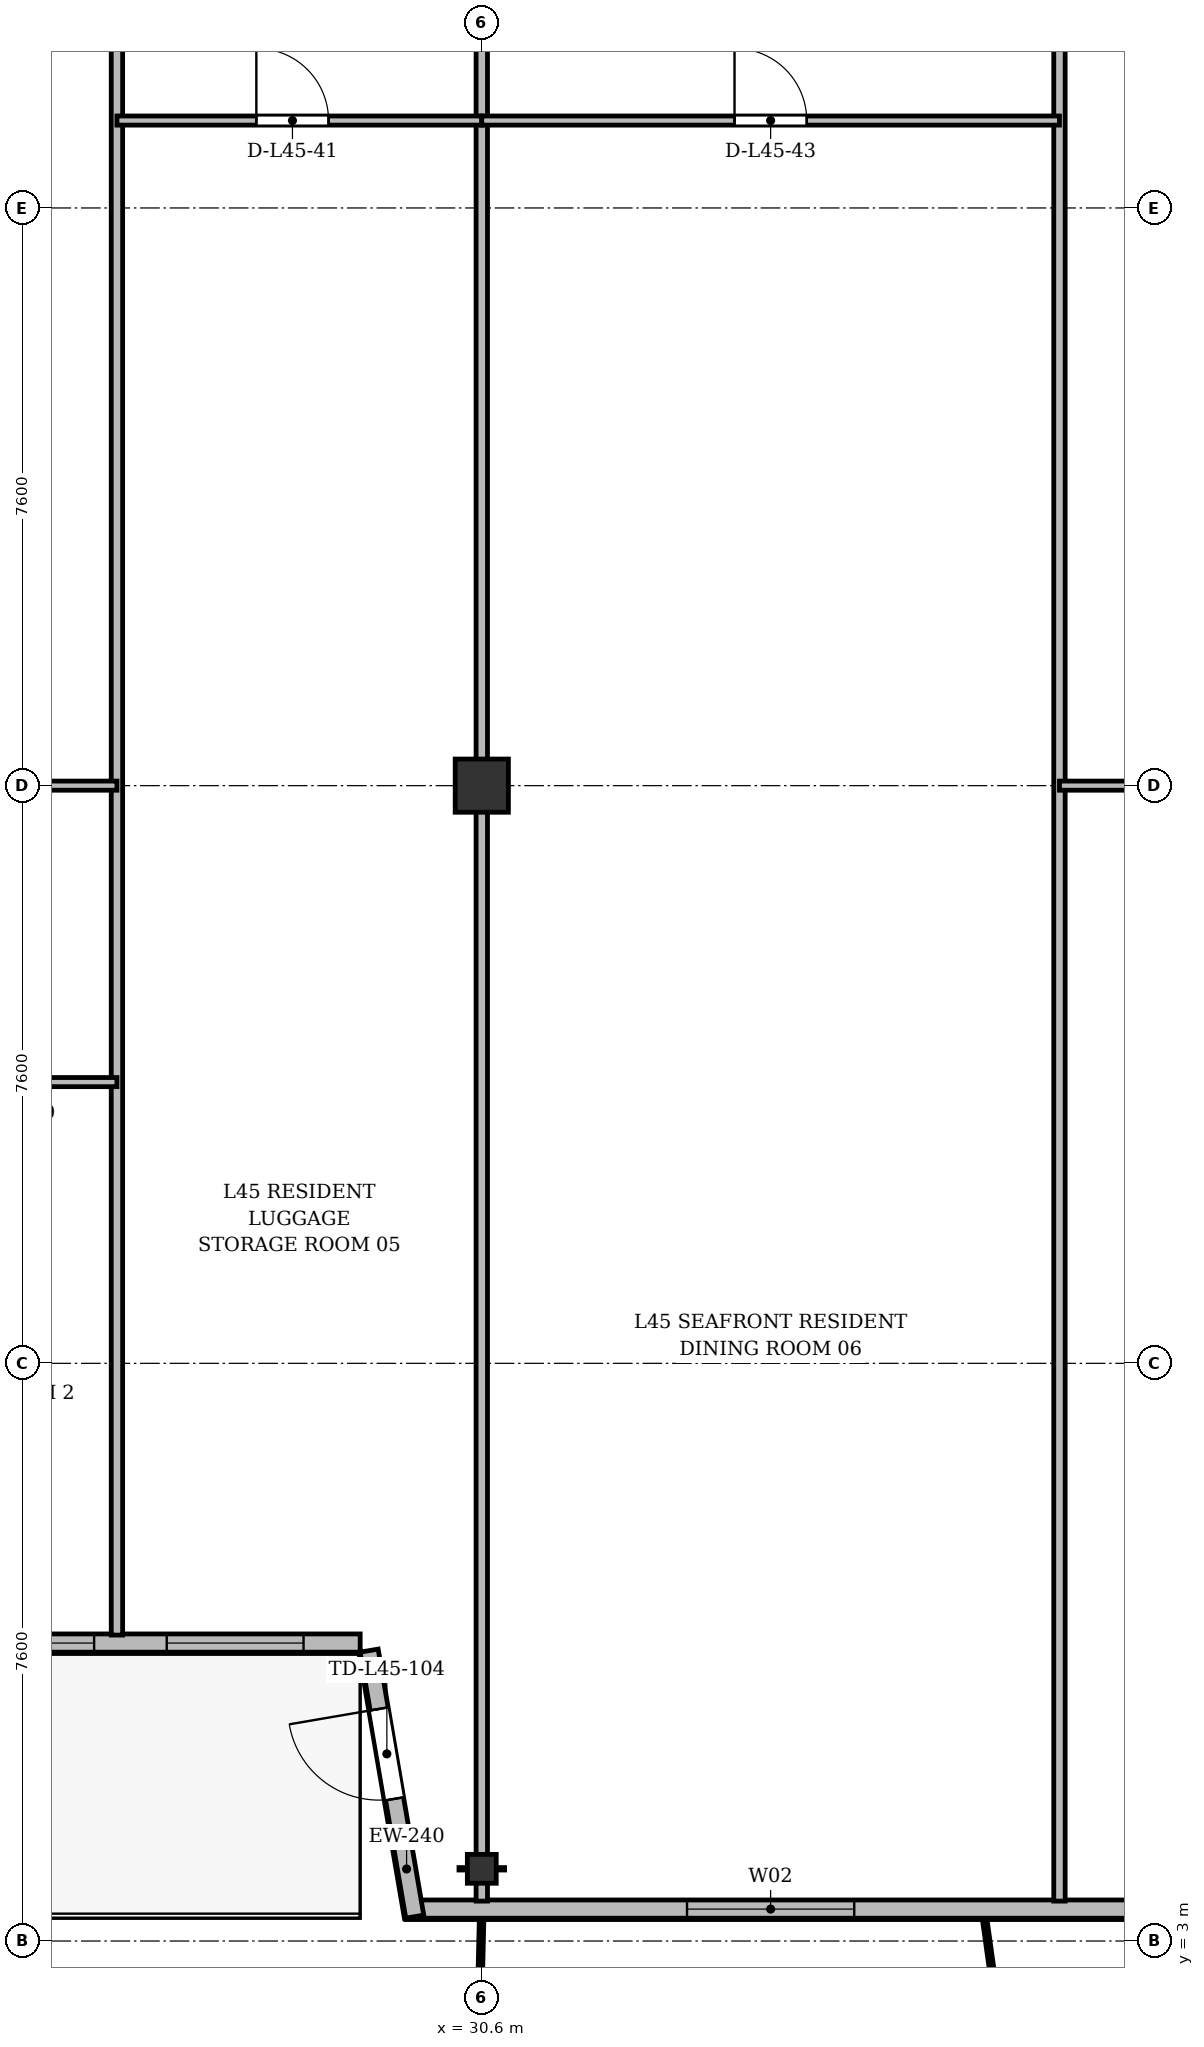
"""IFC4 building model, lengths in metres.
Left out: names, types, materials, properties, quantities, classifications, styles, units other than length and angle.
Written with IfcOpenShell. Run it as: python <this file> out.ifc"""

import sys

from ifc_helpers import new_model, si_unit, direction, frame, frame_2d, origin, origin_2d, place, context, subcontext, project, spatial, rectangle, i_section, extrude, source, transform, mapped, element, fill, save


model = new_model("IFC4")
c1 = context("Model", 3, precision=1e-05, world=origin(), true_north=direction((0.0, 1.0)))
c2 = subcontext(c1, "Body", "Model", "MODEL_VIEW")
j1 = project(units=[si_unit("LENGTHUNIT", "METRE"), si_unit("PLANEANGLEUNIT", "RADIAN")], contexts=[c1])
p1 = place(None, origin())
s1 = spatial("IfcSite", under=j1, at=p1, CompositionType="ELEMENT")
p2 = place(p1, origin())
s2 = spatial("IfcBuilding", under=s1, at=p2, CompositionType="ELEMENT")
p3 = place(p2, frame((0.0, 0.0, 171.7)))
s3 = spatial("IfcBuildingStorey", under=s2, at=p3, CompositionType="ELEMENT", Elevation=171.7)
m1 = source(origin(), c2, "Body", "SweptSolid", [
    extrude(i_section(OverallWidth=0.38, OverallDepth=0.38, WebThickness=0.02, FlangeThickness=0.03, at=origin_2d()), origin(), (0.0, 0.0, 1.0), 3.6),
])
p4 = place(p3, frame((30.6, 3.95, 0.0), z_axis=(0.0, 0.0, 1.0), x_axis=(1.0, 0.0, 0.0)))
e1 = element("IfcColumn", 1, at=p4, inside=s3, PredefinedType="COLUMN", context=c2, shape_type="MappedRepresentation", body=[
    mapped(m1, transform((0.0, 0.0, 0.0), x_axis=(1.0, 0.0, 0.0), y_axis=(0.0, 1.0, 0.0), z_axis=(0.0, 0.0, 1.0), scale=1.0)),
])
m2 = source(origin(), c2, "Body", "SweptSolid", [
    extrude(rectangle(XDim=0.7, YDim=0.7, at=origin_2d()), origin(), (0.0, 0.0, 1.0), 3.6),
])
p5 = place(p3, frame((30.6, 18.2, 0.0), z_axis=(0.0, 0.0, 1.0), x_axis=(1.0, 0.0, 0.0)))
e2 = element("IfcColumn", 2, at=p5, inside=s3, PredefinedType="COLUMN", context=c2, shape_type="MappedRepresentation", body=[
    mapped(m2, transform((0.0, 0.0, 0.0), x_axis=(1.0, 0.0, 0.0), y_axis=(0.0, 1.0, 0.0), z_axis=(0.0, 0.0, 1.0), scale=1.0)),
])
p6 = place(p3, frame((63.6, 3.42, 0.0), z_axis=(0.0, 0.0, 1.0), x_axis=(-1.0, 0.0, 0.0)))
e3 = element("IfcWall", 3, at=p6, inside=s3, PredefinedType="SOLIDWALL", context=c2, shape_type="SweptSolid", body=[
    extrude(rectangle(XDim=34.0, YDim=0.24, at=frame_2d((17.0, 0.0))), origin(), (0.0, 0.0, 1.0), 3.35),
])
p7 = place(p6, frame((2.845, 0.0, 0.9)))
e4 = element("IfcOpeningElement", 4, at=p7, cuts=e3, PredefinedType="OPENING", context=c2, shape_type="SweptSolid", body=[
    extrude(rectangle(XDim=1.8, YDim=1.8, at=frame_2d((0.9, 0.9))), frame((0.0, 0.13, 0.0), z_axis=(0.0, -1.0, 0.0), x_axis=(1.0, 0.0, 0.0)), (0.0, 0.0, 1.0), 0.26),
])
p8 = place(p6, frame((7.69, 0.0, 0.0)))
e5 = element("IfcOpeningElement", 5, at=p8, cuts=e3, PredefinedType="OPENING", context=c2, shape_type="SweptSolid", body=[
    extrude(rectangle(XDim=1.2, YDim=2.2, at=frame_2d((0.6, 1.1))), frame((0.0, 0.13, 0.0), z_axis=(0.0, -1.0, 0.0), x_axis=(1.0, 0.0, 0.0)), (0.0, 0.0, 1.0), 0.26),
])
p9 = place(p6, frame((10.25, 0.0, 0.9)))
e6 = element("IfcOpeningElement", 6, at=p9, cuts=e3, PredefinedType="OPENING", context=c2, shape_type="SweptSolid", body=[
    extrude(rectangle(XDim=1.5, YDim=1.75, at=frame_2d((0.75, 0.875))), frame((0.0, 0.13, 0.0), z_axis=(0.0, -1.0, 0.0), x_axis=(1.0, 0.0, 0.0)), (0.0, 0.0, 1.0), 0.26),
])
p10 = place(p6, frame((13.4, 0.0, 0.9)))
e7 = element("IfcOpeningElement", 7, at=p10, cuts=e3, PredefinedType="OPENING", context=c2, shape_type="SweptSolid", body=[
    extrude(rectangle(XDim=2.0, YDim=1.95, at=frame_2d((1.0, 0.975))), frame((0.0, 0.13, 0.0), z_axis=(0.0, -1.0, 0.0), x_axis=(1.0, 0.0, 0.0)), (0.0, 0.0, 1.0), 0.26),
])
p11 = place(p6, frame((17.175, 0.0, 0.9)))
e8 = element("IfcOpeningElement", 8, at=p11, cuts=e3, PredefinedType="OPENING", context=c2, shape_type="SweptSolid", body=[
    extrude(rectangle(XDim=1.65, YDim=1.85, at=frame_2d((0.825, 0.925))), frame((0.0, 0.13, 0.0), z_axis=(0.0, -1.0, 0.0), x_axis=(1.0, 0.0, 0.0)), (0.0, 0.0, 1.0), 0.26),
])
p12 = place(p6, frame((21.7, 0.0, 0.9)))
e9 = element("IfcOpeningElement", 9, at=p12, cuts=e3, PredefinedType="OPENING", context=c2, shape_type="SweptSolid", body=[
    extrude(rectangle(XDim=1.8, YDim=1.8, at=frame_2d((0.9, 0.9))), frame((0.0, 0.13, 0.0), z_axis=(0.0, -1.0, 0.0), x_axis=(1.0, 0.0, 0.0)), (0.0, 0.0, 1.0), 0.26),
])
p13 = place(p6, frame((28.1, 0.0, 0.9)))
e10 = element("IfcOpeningElement", 10, at=p13, cuts=e3, PredefinedType="OPENING", context=c2, shape_type="SweptSolid", body=[
    extrude(rectangle(XDim=2.2, YDim=1.8, at=frame_2d((1.1, 0.9))), frame((0.0, 0.13, 0.0), z_axis=(0.0, -1.0, 0.0), x_axis=(1.0, 0.0, 0.0)), (0.0, 0.0, 1.0), 0.26),
])
p14 = place(p3, frame((29.718, 3.32, 0.0), z_axis=(0.0, 0.0, 1.0), x_axis=(-0.168923741424, 0.98562912375, 0.0)))
e11 = element("IfcWall", 11, at=p14, inside=s3, PredefinedType="SOLIDWALL", context=c2, shape_type="SweptSolid", body=[
    extrude(rectangle(XDim=3.551, YDim=0.24, at=frame_2d((1.775, 0.0))), origin(), (0.0, 0.0, 1.0), 2.75),
])
p15 = place(p14, frame((1.573, 0.0, 0.0)))
e12 = element("IfcOpeningElement", 12, at=p15, cuts=e11, PredefinedType="OPENING", context=c2, shape_type="SweptSolid", body=[
    extrude(rectangle(XDim=1.2, YDim=2.2, at=frame_2d((0.6, 1.1))), frame((0.0, 0.13, 0.0), z_axis=(0.0, -1.0, 0.0), x_axis=(1.0, 0.0, 0.0)), (0.0, 0.0, 1.0), 0.26),
])
p16 = place(p3, frame((29.0, 6.92, 0.0), z_axis=(0.0, 0.0, 1.0), x_axis=(-1.0, 0.0, 0.0)))
e13 = element("IfcWall", 13, at=p16, inside=s3, PredefinedType="SOLIDWALL", context=c2, shape_type="SweptSolid", body=[
    extrude(rectangle(XDim=11.8, YDim=0.24, at=frame_2d((5.9, 0.0))), origin(), (0.0, 0.0, 1.0), 2.85),
])
p17 = place(p16, frame((0.745, 0.0, 0.9)))
e14 = element("IfcOpeningElement", 14, at=p17, cuts=e13, PredefinedType="OPENING", context=c2, shape_type="SweptSolid", body=[
    extrude(rectangle(XDim=1.8, YDim=1.8, at=frame_2d((0.9, 0.9))), frame((0.0, 0.13, 0.0), z_axis=(0.0, -1.0, 0.0), x_axis=(1.0, 0.0, 0.0)), (0.0, 0.0, 1.0), 0.26),
])
p18 = place(p16, frame((3.5, 0.0, 0.9)))
e15 = element("IfcOpeningElement", 15, at=p18, cuts=e13, PredefinedType="OPENING", context=c2, shape_type="SweptSolid", body=[
    extrude(rectangle(XDim=2.2, YDim=1.8, at=frame_2d((1.1, 0.9))), frame((0.0, 0.13, 0.0), z_axis=(0.0, -1.0, 0.0), x_axis=(1.0, 0.0, 0.0)), (0.0, 0.0, 1.0), 0.26),
])
p19 = place(p16, frame((6.65, 0.0, 0.9)))
e16 = element("IfcOpeningElement", 16, at=p19, cuts=e13, PredefinedType="OPENING", context=c2, shape_type="SweptSolid", body=[
    extrude(rectangle(XDim=1.5, YDim=1.75, at=frame_2d((0.75, 0.875))), frame((0.0, 0.13, 0.0), z_axis=(0.0, -1.0, 0.0), x_axis=(1.0, 0.0, 0.0)), (0.0, 0.0, 1.0), 0.26),
])
p20 = place(p16, frame((9.05, 0.0, 0.9)))
e17 = element("IfcOpeningElement", 17, at=p20, cuts=e13, PredefinedType="OPENING", context=c2, shape_type="SweptSolid", body=[
    extrude(rectangle(XDim=1.5, YDim=1.75, at=frame_2d((0.75, 0.875))), frame((0.0, 0.13, 0.0), z_axis=(0.0, -1.0, 0.0), x_axis=(1.0, 0.0, 0.0)), (0.0, 0.0, 1.0), 0.26),
])
p21 = place(p3, frame((25.8, 7.025, 0.0), z_axis=(0.0, 0.0, 1.0), x_axis=(0.0, 1.0, 0.0)))
e18 = element("IfcWall", 18, at=p21, inside=s3, PredefinedType="PARTITIONING", context=c2, shape_type="SweptSolid", body=[
    extrude(rectangle(XDim=23.775, YDim=0.15, at=frame_2d((11.888, 0.0))), origin(), (0.0, 0.0, 1.0), 2.75),
])
p22 = place(p3, frame((30.6, 3.525, 0.0), z_axis=(0.0, 0.0, 1.0), x_axis=(0.0, 1.0, 0.0)))
e19 = element("IfcWall", 19, at=p22, inside=s3, PredefinedType="PARTITIONING", context=c2, shape_type="SweptSolid", body=[
    extrude(rectangle(XDim=27.275, YDim=0.15, at=frame_2d((13.638, 0.0))), origin(), (0.0, 0.0, 1.0), 2.85),
])
p23 = place(p3, frame((38.2, 3.525, 0.0), z_axis=(0.0, 0.0, 1.0), x_axis=(0.0, 1.0, 0.0)))
e20 = element("IfcWall", 20, at=p23, inside=s3, PredefinedType="PARTITIONING", context=c2, shape_type="SweptSolid", body=[
    extrude(rectangle(XDim=27.275, YDim=0.15, at=frame_2d((13.638, 0.0))), origin(), (0.0, 0.0, 1.0), 2.75),
])
p24 = place(p3, frame((20.2, 18.2, 0.0), z_axis=(0.0, 0.0, 1.0), x_axis=(1.0, 0.0, 0.0)))
e21 = element("IfcWall", 21, at=p24, inside=s3, PredefinedType="PARTITIONING", context=c2, shape_type="SweptSolid", body=[
    extrude(rectangle(XDim=5.6, YDim=0.12, at=frame_2d((2.8, 0.0))), origin(), (0.0, 0.0, 1.0), 2.75),
])
p25 = place(p24, frame((1.306, 0.0, 0.0)))
e22 = element("IfcOpeningElement", 22, at=p25, cuts=e21, PredefinedType="OPENING", context=c2, shape_type="SweptSolid", body=[
    extrude(rectangle(XDim=0.95, YDim=2.15, at=frame_2d((0.475, 1.075))), frame((0.0, 0.07, 0.0), z_axis=(0.0, -1.0, 0.0), x_axis=(1.0, 0.0, 0.0)), (0.0, 0.0, 1.0), 0.14),
])
p26 = place(p3, frame((23.0, 14.3, 0.0), z_axis=(0.0, 0.0, 1.0), x_axis=(1.0, 0.0, 0.0)))
e23 = element("IfcWall", 23, at=p26, inside=s3, PredefinedType="PARTITIONING", context=c2, shape_type="SweptSolid", body=[
    extrude(rectangle(XDim=2.8, YDim=0.12, at=frame_2d((1.4, 0.0))), origin(), (0.0, 0.0, 1.0), 2.85),
])
p27 = place(p26, frame((0.925, 0.0, 0.0)))
e24 = element("IfcOpeningElement", 24, at=p27, cuts=e23, PredefinedType="OPENING", context=c2, shape_type="SweptSolid", body=[
    extrude(rectangle(XDim=0.95, YDim=2.15, at=frame_2d((0.475, 1.075))), frame((0.0, 0.07, 0.0), z_axis=(0.0, -1.0, 0.0), x_axis=(1.0, 0.0, 0.0)), (0.0, 0.0, 1.0), 0.14),
])
p28 = place(p3, frame((25.8, 26.95, 0.0), z_axis=(0.0, 0.0, 1.0), x_axis=(1.0, 0.0, 0.0)))
e25 = element("IfcWall", 25, at=p28, inside=s3, PredefinedType="PARTITIONING", context=c2, shape_type="SweptSolid", body=[
    extrude(rectangle(XDim=4.8, YDim=0.12, at=frame_2d((2.4, 0.0))), origin(), (0.0, 0.0, 1.0), 2.85),
])
p29 = place(p28, frame((1.834, 0.0, 0.0)))
e26 = element("IfcOpeningElement", 26, at=p29, cuts=e25, PredefinedType="OPENING", context=c2, shape_type="SweptSolid", body=[
    extrude(rectangle(XDim=0.95, YDim=2.15, at=frame_2d((0.475, 1.075))), frame((0.0, 0.07, 0.0), z_axis=(0.0, -1.0, 0.0), x_axis=(1.0, 0.0, 0.0)), (0.0, 0.0, 1.0), 0.14),
])
p30 = place(p3, frame((30.6, 26.95, 0.0), z_axis=(0.0, 0.0, 1.0), x_axis=(1.0, 0.0, 0.0)))
e27 = element("IfcWall", 27, at=p30, inside=s3, PredefinedType="PARTITIONING", context=c2, shape_type="SweptSolid", body=[
    extrude(rectangle(XDim=7.6, YDim=0.12, at=frame_2d((3.8, 0.0))), origin(), (0.0, 0.0, 1.0), 2.85),
])
p31 = place(p30, frame((3.325, 0.0, 0.0)))
e28 = element("IfcOpeningElement", 28, at=p31, cuts=e27, PredefinedType="OPENING", context=c2, shape_type="SweptSolid", body=[
    extrude(rectangle(XDim=0.95, YDim=2.15, at=frame_2d((0.475, 1.075))), frame((0.0, 0.07, 0.0), z_axis=(0.0, -1.0, 0.0), x_axis=(1.0, 0.0, 0.0)), (0.0, 0.0, 1.0), 0.14),
])
p32 = place(p3, frame((38.2, 18.2, 0.0), z_axis=(0.0, 0.0, 1.0), x_axis=(1.0, 0.0, 0.0)))
e29 = element("IfcWall", 29, at=p32, inside=s3, PredefinedType="PARTITIONING", context=c2, shape_type="SweptSolid", body=[
    extrude(rectangle(XDim=5.6, YDim=0.12, at=frame_2d((2.8, 0.0))), origin(), (0.0, 0.0, 1.0), 2.75),
])
p33 = place(p32, frame((2.232, 0.0, 0.0)))
e30 = element("IfcOpeningElement", 30, at=p33, cuts=e29, PredefinedType="OPENING", context=c2, shape_type="SweptSolid", body=[
    extrude(rectangle(XDim=0.95, YDim=2.15, at=frame_2d((0.475, 1.075))), frame((0.0, 0.07, 0.0), z_axis=(0.0, -1.0, 0.0), x_axis=(1.0, 0.0, 0.0)), (0.0, 0.0, 1.0), 0.14),
])
m3 = source(origin(), c2, "Body", "SweptSolid", [
    extrude(rectangle(XDim=2.2, YDim=1.8, at=frame_2d((1.1, 0.9))), frame((0.0, 0.03, 0.0), z_axis=(0.0, -1.0, 0.0), x_axis=(1.0, 0.0, 0.0)), (0.0, 0.0, 1.0), 0.06),
])
p34 = place(p13, origin())
e31 = element("IfcWindow", 31, at=p34, inside=s3, PartitioningType="SINGLE_PANEL", PredefinedType="WINDOW", context=c2, shape_type="MappedRepresentation", body=[
    mapped(m3, transform((0.0, 0.0, 0.0), x_axis=(1.0, 0.0, 0.0), y_axis=(0.0, 1.0, 0.0), z_axis=(0.0, 0.0, 1.0), scale=1.0)),
])
fill(e10, e31)
m4 = source(origin(), c2, "Body", "SweptSolid", [
    extrude(rectangle(XDim=1.2, YDim=2.2, at=frame_2d((0.6, 1.1))), frame((0.0, 0.025, 0.0), z_axis=(0.0, -1.0, 0.0), x_axis=(1.0, 0.0, 0.0)), (0.0, 0.0, 1.0), 0.05),
])
p35 = place(p15, origin())
e32 = element("IfcDoor", 32, at=p35, inside=s3, OperationType="SINGLE_SWING_RIGHT", PredefinedType="DOOR", context=c2, shape_type="MappedRepresentation", body=[
    mapped(m4, transform((0.0, 0.0, 0.0), x_axis=(1.0, 0.0, 0.0), y_axis=(0.0, 1.0, 0.0), z_axis=(0.0, 0.0, 1.0), scale=1.0)),
])
fill(e12, e32)
m5 = source(origin(), c2, "Body", "SweptSolid", [
    extrude(rectangle(XDim=1.8, YDim=1.8, at=frame_2d((0.9, 0.9))), frame((0.0, 0.03, 0.0), z_axis=(0.0, -1.0, 0.0), x_axis=(1.0, 0.0, 0.0)), (0.0, 0.0, 1.0), 0.06),
])
p36 = place(p17, origin())
e33 = element("IfcWindow", 33, at=p36, inside=s3, PartitioningType="SINGLE_PANEL", PredefinedType="WINDOW", context=c2, shape_type="MappedRepresentation", body=[
    mapped(m5, transform((0.0, 0.0, 0.0), x_axis=(1.0, 0.0, 0.0), y_axis=(0.0, 1.0, 0.0), z_axis=(0.0, 0.0, 1.0), scale=1.0)),
])
fill(e14, e33)
p37 = place(p18, origin())
e34 = element("IfcWindow", 34, at=p37, inside=s3, PartitioningType="SINGLE_PANEL", PredefinedType="WINDOW", context=c2, shape_type="MappedRepresentation", body=[
    mapped(m3, transform((0.0, 0.0, 0.0), x_axis=(1.0, 0.0, 0.0), y_axis=(0.0, 1.0, 0.0), z_axis=(0.0, 0.0, 1.0), scale=1.0)),
])
fill(e15, e34)
m6 = source(origin(), c2, "Body", "SweptSolid", [
    extrude(rectangle(XDim=0.95, YDim=2.15, at=frame_2d((0.475, 1.075))), frame((0.0, 0.025, 0.0), z_axis=(0.0, -1.0, 0.0), x_axis=(1.0, 0.0, 0.0)), (0.0, 0.0, 1.0), 0.05),
])
p38 = place(p29, origin())
e35 = element("IfcDoor", 35, at=p38, inside=s3, OperationType="SINGLE_SWING_LEFT", PredefinedType="DOOR", context=c2, shape_type="MappedRepresentation", body=[
    mapped(m6, transform((0.0, 0.0, 0.0), x_axis=(1.0, 0.0, 0.0), y_axis=(0.0, 1.0, 0.0), z_axis=(0.0, 0.0, 1.0), scale=1.0)),
])
fill(e26, e35)
p39 = place(p31, origin())
e36 = element("IfcDoor", 36, at=p39, inside=s3, OperationType="SINGLE_SWING_LEFT", PredefinedType="DOOR", context=c2, shape_type="MappedRepresentation", body=[
    mapped(m6, transform((0.0, 0.0, 0.0), x_axis=(1.0, 0.0, 0.0), y_axis=(0.0, 1.0, 0.0), z_axis=(0.0, 0.0, 1.0), scale=1.0)),
])
fill(e28, e36)
save(model, sys.argv[1])
